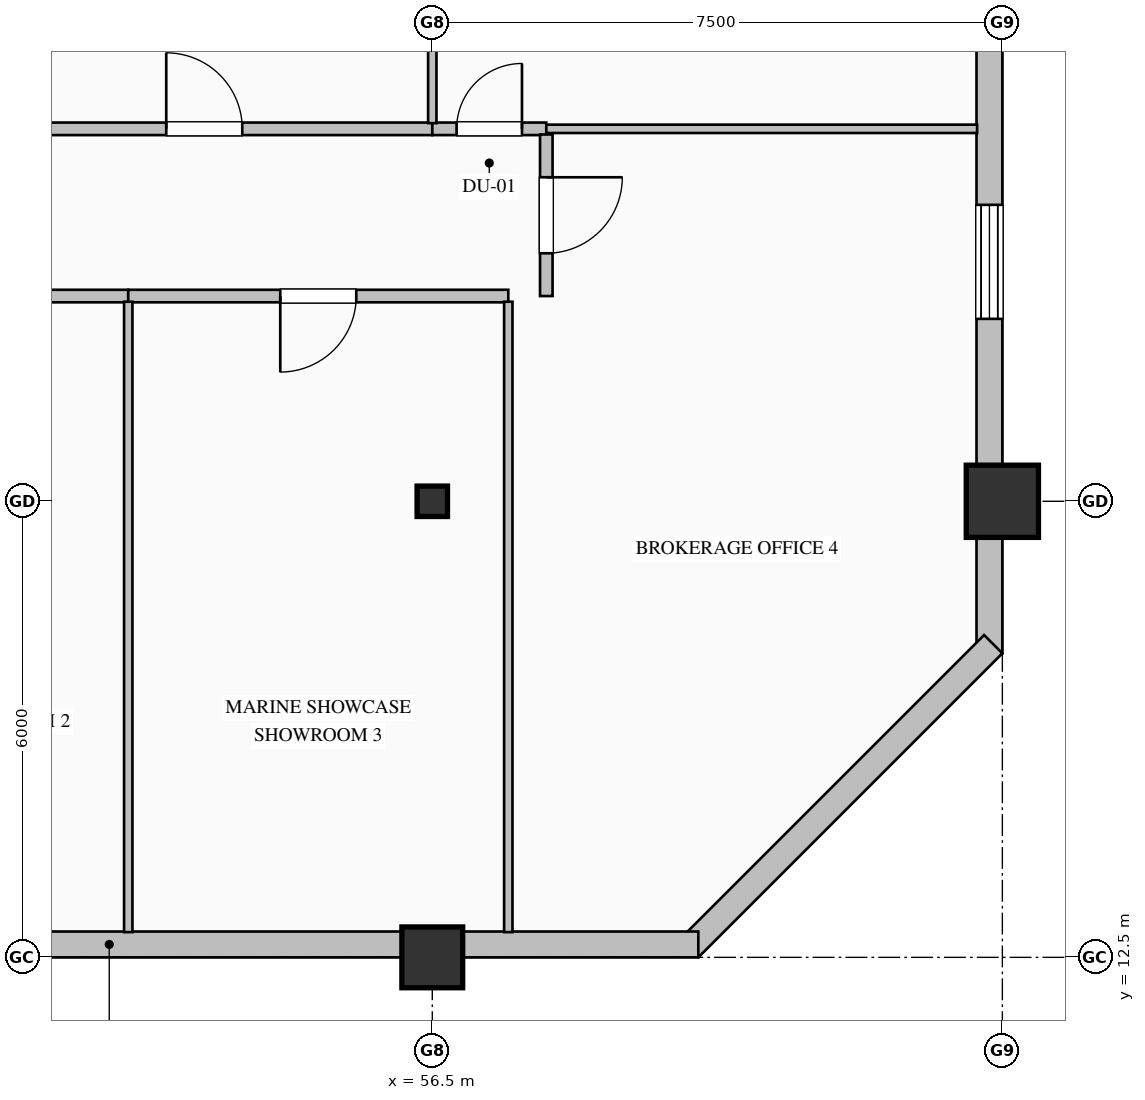
"""IFC4 building model, lengths in metres.
Left out: names, types, materials, properties, quantities, classifications, styles, units other than length and angle.
Written with IfcOpenShell. Run it as: python <this file> out.ifc"""

import sys

from ifc_helpers import new_model, si_unit, direction, frame, frame_2d, origin, origin_2d, place, context, subcontext, project, spatial, rectangle, hollow_rectangle, i_section, extrude, element, fill, save


model = new_model("IFC4")
c1 = context("Model", 3, precision=1e-05, world=origin(), true_north=direction((0.0, 1.0)))
c2 = subcontext(c1, "Body", "Model", "MODEL_VIEW")
j1 = project(units=[si_unit("LENGTHUNIT", "METRE"), si_unit("PLANEANGLEUNIT", "RADIAN")], contexts=[c1])
p1 = place(None, origin())
s1 = spatial("IfcSite", under=j1, at=p1, CompositionType="ELEMENT")
p2 = place(p1, origin())
s2 = spatial("IfcBuilding", under=s1, at=p2, CompositionType="ELEMENT")
p3 = place(p2, frame((0.0, 0.0, 269.8)))
s3 = spatial("IfcBuildingStorey", under=s2, at=p3, CompositionType="ELEMENT", Elevation=269.8)
p4 = place(p3, frame((56.5, 12.5, 0.0), z_axis=(0.0, 0.0, 1.0), x_axis=(1.0, 0.0, 0.0)))
e1 = element("IfcColumn", 1, at=p4, inside=s3, PredefinedType="COLUMN", context=c2, shape_type="SweptSolid", body=[
    extrude(hollow_rectangle(XDim=0.8, YDim=0.8, WallThickness=0.032, at=origin_2d()), origin(), (0.0, 0.0, 1.0), 4.0),
])
p5 = place(p3, frame((56.5, 18.5, 0.0), z_axis=(0.0, 0.0, 1.0), x_axis=(1.0, 0.0, 0.0)))
e2 = element("IfcColumn", 2, at=p5, inside=s3, PredefinedType="COLUMN", context=c2, shape_type="SweptSolid", body=[
    extrude(i_section(OverallWidth=0.4, OverallDepth=0.4, WebThickness=0.013, FlangeThickness=0.021, FilletRadius=0.022, at=origin_2d()), origin(), (0.0, 0.0, 1.0), 4.0),
])
p6 = place(p3, frame((64.0, 18.5, 0.0), z_axis=(0.0, 0.0, 1.0), x_axis=(1.0, 0.0, 0.0)))
e3 = element("IfcColumn", 3, at=p6, inside=s3, PredefinedType="COLUMN", context=c2, shape_type="SweptSolid", body=[
    extrude(hollow_rectangle(XDim=0.95, YDim=0.95, WallThickness=0.036, at=origin_2d()), origin(), (0.0, 0.0, 1.0), 4.0),
])
p7 = place(p3, frame((63.83, 36.05, 0.0), z_axis=(0.0, 0.0, 1.0), x_axis=(0.0, -1.0, 0.0)))
e4 = element("IfcWall", 4, at=p7, inside=s3, PredefinedType="SOLIDWALL", context=c2, shape_type="SweptSolid", body=[
    extrude(rectangle(XDim=19.55, YDim=0.34, at=frame_2d((9.775, 0.0))), origin(), (0.0, 0.0, 1.0), 3.325),
])
p8 = place(p7, frame((2.85, 0.0, 0.7)))
e5 = element("IfcOpeningElement", 5, at=p8, cuts=e4, PredefinedType="OPENING", context=c2, shape_type="SweptSolid", body=[
    extrude(rectangle(XDim=1.5, YDim=2.4, at=frame_2d((0.75, 1.2))), frame((0.0, 0.18, 0.0), z_axis=(0.0, -1.0, 0.0), x_axis=(1.0, 0.0, 0.0)), (0.0, 0.0, 1.0), 0.36),
])
p9 = place(p7, frame((10.125, 0.0, 0.9)))
e6 = element("IfcOpeningElement", 6, at=p9, cuts=e4, PredefinedType="OPENING", context=c2, shape_type="SweptSolid", body=[
    extrude(rectangle(XDim=1.35, YDim=1.85, at=frame_2d((0.675, 0.925))), frame((0.0, 0.18, 0.0), z_axis=(0.0, -1.0, 0.0), x_axis=(1.0, 0.0, 0.0)), (0.0, 0.0, 1.0), 0.36),
])
p10 = place(p7, frame((13.65, 0.0, 0.7)))
e7 = element("IfcOpeningElement", 7, at=p10, cuts=e4, PredefinedType="OPENING", context=c2, shape_type="SweptSolid", body=[
    extrude(rectangle(XDim=1.5, YDim=2.4, at=frame_2d((0.75, 1.2))), frame((0.0, 0.18, 0.0), z_axis=(0.0, -1.0, 0.0), x_axis=(1.0, 0.0, 0.0)), (0.0, 0.0, 1.0), 0.36),
])
p11 = place(p3, frame((63.88, 16.62, 0.0), z_axis=(0.0, 0.0, 1.0), x_axis=(-0.707106781187, -0.707106781187, 0.0)))
e8 = element("IfcWall", 8, at=p11, inside=s3, PredefinedType="SOLIDWALL", context=c2, shape_type="SweptSolid", body=[
    extrude(rectangle(XDim=5.657, YDim=0.34, at=frame_2d((2.828, 0.0))), origin(), (0.0, 0.0, 1.0), 3.775),
])
p12 = place(p3, frame((60.0, 12.67, 0.0), z_axis=(0.0, 0.0, 1.0), x_axis=(-1.0, 0.0, 0.0)))
e9 = element("IfcWall", 9, at=p12, inside=s3, PredefinedType="SOLIDWALL", context=c2, shape_type="SweptSolid", body=[
    extrude(rectangle(XDim=15.5, YDim=0.34, at=frame_2d((7.75, 0.0))), origin(), (0.0, 0.0, 1.0), 3.325),
])
p13 = place(p3, frame((50.5, 23.4, 0.0), z_axis=(0.0, 0.0, 1.0), x_axis=(1.0, 0.0, 0.0)))
e10 = element("IfcWall", 10, at=p13, inside=s3, PredefinedType="PARTITIONING", context=c2, shape_type="SweptSolid", body=[
    extrude(rectangle(XDim=6.0, YDim=0.165, at=frame_2d((3.0, 0.0))), origin(), (0.0, 0.0, 1.0), 3.467),
])
p14 = place(p13, frame((2.5, 0.0, 0.0)))
e11 = element("IfcOpeningElement", 11, at=p14, cuts=e10, PredefinedType="OPENING", context=c2, shape_type="SweptSolid", body=[
    extrude(rectangle(XDim=1.0, YDim=2.15, at=frame_2d((0.5, 1.075))), frame((0.0, 0.093, 0.0), z_axis=(0.0, -1.0, 0.0), x_axis=(1.0, 0.0, 0.0)), (0.0, 0.0, 1.0), 0.185),
])
p15 = place(p3, frame((56.5, 23.4, 0.0), z_axis=(0.0, 0.0, 1.0), x_axis=(1.0, 0.0, 0.0)))
e12 = element("IfcWall", 12, at=p15, inside=s3, PredefinedType="PARTITIONING", context=c2, shape_type="SweptSolid", body=[
    extrude(rectangle(XDim=1.5, YDim=0.165, at=frame_2d((0.75, 0.0))), origin(), (0.0, 0.0, 1.0), 3.775),
])
p16 = place(p15, frame((0.32, 0.0, 0.0)))
e13 = element("IfcOpeningElement", 13, at=p16, cuts=e12, PredefinedType="OPENING", context=c2, shape_type="SweptSolid", body=[
    extrude(rectangle(XDim=0.86, YDim=2.1, at=frame_2d((0.43, 1.05))), frame((0.0, 0.093, 0.0), z_axis=(0.0, -1.0, 0.0), x_axis=(1.0, 0.0, 0.0)), (0.0, 0.0, 1.0), 0.185),
])
p17 = place(p3, frame((52.5, 21.2, 0.0), z_axis=(0.0, 0.0, 1.0), x_axis=(-1.0, 0.0, 0.0)))
e14 = element("IfcWall", 14, at=p17, inside=s3, PredefinedType="PARTITIONING", context=c2, shape_type="SweptSolid", body=[
    extrude(rectangle(XDim=5.0, YDim=0.165, at=frame_2d((2.5, 0.0))), origin(), (0.0, 0.0, 1.0), 3.775),
])
p18 = place(p17, frame((1.95, 0.0, 0.0)))
e15 = element("IfcOpeningElement", 15, at=p18, cuts=e14, PredefinedType="OPENING", context=c2, shape_type="SweptSolid", body=[
    extrude(rectangle(XDim=1.1, YDim=2.2, at=frame_2d((0.55, 1.1))), frame((0.0, 0.093, 0.0), z_axis=(0.0, -1.0, 0.0), x_axis=(1.0, 0.0, 0.0)), (0.0, 0.0, 1.0), 0.185),
])
p19 = place(p3, frame((57.5, 21.2, 0.0), z_axis=(0.0, 0.0, 1.0), x_axis=(-1.0, 0.0, 0.0)))
e16 = element("IfcWall", 16, at=p19, inside=s3, PredefinedType="PARTITIONING", context=c2, shape_type="SweptSolid", body=[
    extrude(rectangle(XDim=5.0, YDim=0.165, at=frame_2d((2.5, 0.0))), origin(), (0.0, 0.0, 1.0), 3.775),
])
p20 = place(p19, frame((2.0, 0.0, 0.0)))
e17 = element("IfcOpeningElement", 17, at=p20, cuts=e16, PredefinedType="OPENING", context=c2, shape_type="SweptSolid", body=[
    extrude(rectangle(XDim=1.0, YDim=2.15, at=frame_2d((0.5, 1.075))), frame((0.0, 0.093, 0.0), z_axis=(0.0, -1.0, 0.0), x_axis=(1.0, 0.0, 0.0)), (0.0, 0.0, 1.0), 0.185),
])
p21 = place(p3, frame((58.0, 23.325, 0.0), z_axis=(0.0, 0.0, 1.0), x_axis=(0.0, -1.0, 0.0)))
e18 = element("IfcWall", 18, at=p21, inside=s3, PredefinedType="PARTITIONING", context=c2, shape_type="SweptSolid", body=[
    extrude(rectangle(XDim=2.125, YDim=0.165, at=frame_2d((1.063, 0.0))), origin(), (0.0, 0.0, 1.0), 3.775),
])
p22 = place(p21, frame((0.563, 0.0, 0.0)))
e19 = element("IfcOpeningElement", 19, at=p22, cuts=e18, PredefinedType="OPENING", context=c2, shape_type="SweptSolid", body=[
    extrude(rectangle(XDim=1.0, YDim=2.15, at=frame_2d((0.5, 1.075))), frame((0.0, 0.093, 0.0), z_axis=(0.0, -1.0, 0.0), x_axis=(1.0, 0.0, 0.0)), (0.0, 0.0, 1.0), 0.185),
])
p23 = place(p3, frame((56.5, 29.023, 0.0), z_axis=(0.0, 0.0, 1.0), x_axis=(0.0, -1.0, 0.0)))
e20 = element("IfcWall", 20, at=p23, inside=s3, PredefinedType="MOVABLE", context=c2, shape_type="SweptSolid", body=[
    extrude(rectangle(XDim=5.548, YDim=0.11, at=frame_2d((2.774, 0.0))), origin(), (0.0, 0.0, 1.0), 2.967),
])
p24 = place(p3, frame((63.668, 23.4, 0.0), z_axis=(0.0, 0.0, 1.0), x_axis=(-1.0, 0.0, 0.0)))
e21 = element("IfcWall", 21, at=p24, inside=s3, PredefinedType="MOVABLE", context=c2, shape_type="SweptSolid", body=[
    extrude(rectangle(XDim=5.668, YDim=0.11, at=frame_2d((2.834, 0.0))), origin(), (0.0, 0.0, 1.0), 3.775),
])
for number, where, z_axis, x_axis in (
    (22, (52.5, 21.125, 0.0), (0.0, 0.0, 1.0), (0.0, -1.0, 0.0)),
    (23, (57.5, 21.125, 0.0), (0.0, 0.0, 1.0), (0.0, -1.0, 0.0)),
):
    element("IfcWall", number, at=place(p3, frame(where, z_axis=z_axis, x_axis=x_axis)), inside=s3, PredefinedType="MOVABLE", context=c2, shape_type="SweptSolid", body=[
        extrude(rectangle(XDim=8.293, YDim=0.11, at=frame_2d((4.147, 0.0))), origin(), (0.0, 0.0, 1.0), 3.775),
    ])
p25 = place(p10, origin())
e24 = element("IfcWindow", 24, at=p25, inside=s3, PartitioningType="DOUBLE_PANEL_HORIZONTAL", PredefinedType="WINDOW", context=c2, shape_type="SweptSolid", body=[
    extrude(rectangle(XDim=1.5, YDim=2.4, at=frame_2d((0.75, 1.2))), frame((0.0, 0.15, 0.0), z_axis=(0.0, -1.0, 0.0), x_axis=(1.0, 0.0, 0.0)), (0.0, 0.0, 1.0), 0.06),
])
fill(e7, e24)
p26 = place(p14, origin())
e25 = element("IfcDoor", 25, at=p26, inside=s3, OperationType="SINGLE_SWING_LEFT", PredefinedType="DOOR", context=c2, shape_type="SweptSolid", body=[
    extrude(rectangle(XDim=1.0, YDim=2.15, at=frame_2d((0.5, 1.075))), frame((0.0, 0.025, 0.0), z_axis=(0.0, -1.0, 0.0), x_axis=(1.0, 0.0, 0.0)), (0.0, 0.0, 1.0), 0.05),
])
fill(e11, e25)
p27 = place(p16, origin())
e26 = element("IfcDoor", 26, at=p27, inside=s3, OperationType="SINGLE_SWING_RIGHT", PredefinedType="DOOR", context=c2, shape_type="SweptSolid", body=[
    extrude(rectangle(XDim=0.86, YDim=2.1, at=frame_2d((0.43, 1.05))), frame((0.0, 0.025, 0.0), z_axis=(0.0, -1.0, 0.0), x_axis=(1.0, 0.0, 0.0)), (0.0, 0.0, 1.0), 0.05),
])
fill(e13, e26)
p28 = place(p20, origin())
e27 = element("IfcDoor", 27, at=p28, inside=s3, OperationType="SINGLE_SWING_RIGHT", PredefinedType="DOOR", context=c2, shape_type="SweptSolid", body=[
    extrude(rectangle(XDim=1.0, YDim=2.15, at=frame_2d((0.5, 1.075))), frame((0.0, 0.025, 0.0), z_axis=(0.0, -1.0, 0.0), x_axis=(1.0, 0.0, 0.0)), (0.0, 0.0, 1.0), 0.05),
])
fill(e17, e27)
p29 = place(p22, origin())
e28 = element("IfcDoor", 28, at=p29, inside=s3, OperationType="SINGLE_SWING_LEFT", PredefinedType="DOOR", context=c2, shape_type="SweptSolid", body=[
    extrude(rectangle(XDim=1.0, YDim=2.15, at=frame_2d((0.5, 1.075))), frame((0.0, 0.025, 0.0), z_axis=(0.0, -1.0, 0.0), x_axis=(1.0, 0.0, 0.0)), (0.0, 0.0, 1.0), 0.05),
])
fill(e19, e28)
save(model, sys.argv[1])
